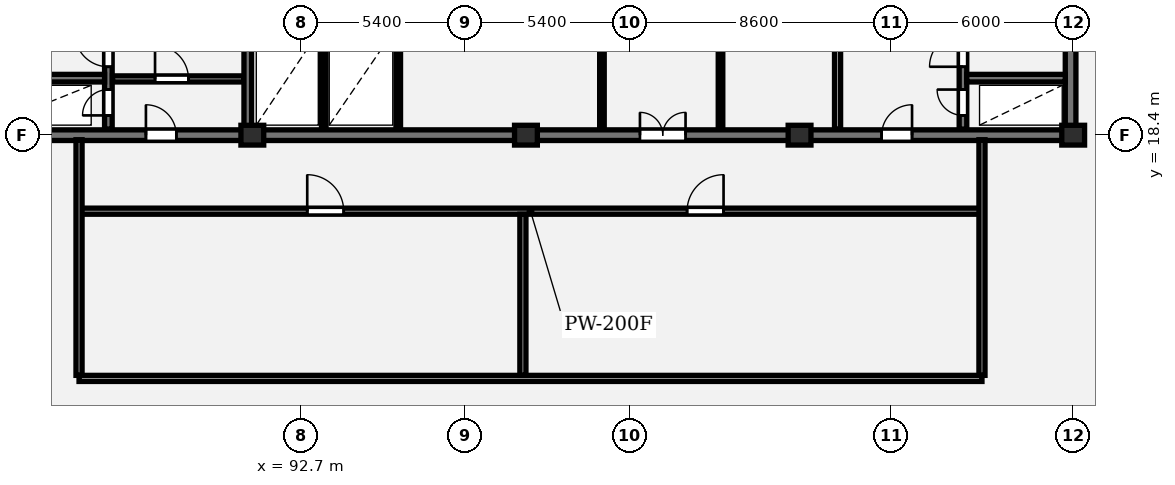
"""IFC4 building model, lengths in metres.
Left out: names, types, materials, properties, quantities, classifications, styles, units other than length and angle.
Written with IfcOpenShell. Run it as: python <this file> out.ifc"""

import sys

from ifc_helpers import new_model, si_unit, direction, frame, frame_2d, origin, origin_2d, place, context, subcontext, project, spatial, rectangle, extrude, element, fill, save


model = new_model("IFC4")
c1 = context("Model", 3, precision=1e-05, world=origin(), true_north=direction((0.0, 1.0)))
c2 = subcontext(c1, "Body", "Model", "MODEL_VIEW")
j1 = project(units=[si_unit("LENGTHUNIT", "METRE"), si_unit("PLANEANGLEUNIT", "RADIAN")], contexts=[c1])
p1 = place(None, origin())
s1 = spatial("IfcSite", under=j1, at=p1, CompositionType="ELEMENT")
p2 = place(p1, origin())
s2 = spatial("IfcBuilding", under=s1, at=p2, CompositionType="ELEMENT")
p3 = place(p2, frame((0.0, 0.0, 204.35)))
s3 = spatial("IfcBuildingStorey", under=s2, at=p3, CompositionType="ELEMENT", Elevation=204.35)
for number, where, z_axis, x_axis in (
    (1, (91.1, 18.4, 0.0), (0.0, 0.0, 1.0), (1.0, 0.0, 0.0)),
    (2, (100.1, 18.4, 0.0), (0.0, 0.0, 1.0), (1.0, 0.0, 0.0)),
    (3, (109.1, 18.4, 0.0), (0.0, 0.0, 1.0), (1.0, 0.0, 0.0)),
    (4, (118.1, 18.4, 0.0), (0.0, 0.0, 1.0), (1.0, 0.0, 0.0)),
):
    element("IfcColumn", number, at=place(p3, frame(where, z_axis=z_axis, x_axis=x_axis)), inside=s3, PredefinedType="COLUMN", context=c2, shape_type="SweptSolid", body=[
        extrude(rectangle(XDim=0.75, YDim=0.65, at=origin_2d()), origin(), (0.0, 0.0, 1.0), 3.25),
    ])
p4 = place(p3, frame((118.015, 18.575, 0.0), z_axis=(0.0, 0.0, 1.0), x_axis=(0.0, 1.0, 0.0)))
e5 = element("IfcWall", 5, at=p4, inside=s3, PredefinedType="SHEAR", context=c2, shape_type="SweptSolid", body=[
    extrude(rectangle(XDim=11.65, YDim=0.35, at=frame_2d((5.825, 0.0))), origin(), (0.0, 0.0, 1.0), 3.25),
])
p5 = place(p3, frame((81.925, 18.4, 0.0), z_axis=(0.0, 0.0, 1.0), x_axis=(1.0, 0.0, 0.0)))
e6 = element("IfcWall", 6, at=p5, inside=s3, PredefinedType="SHEAR", context=c2, shape_type="SweptSolid", body=[
    extrude(rectangle(XDim=36.265, YDim=0.35, at=frame_2d((18.132, 0.0))), origin(), (0.0, 0.0, 1.0), 3.25),
])
p6 = place(p5, frame((5.675, 0.0, 0.0)))
e7 = element("IfcOpeningElement", 7, at=p6, cuts=e6, PredefinedType="OPENING", context=c2, shape_type="SweptSolid", body=[
    extrude(rectangle(XDim=1.0, YDim=2.15, at=frame_2d((0.5, 1.075))), frame((0.0, 0.185, 0.0), z_axis=(0.0, -1.0, 0.0), x_axis=(1.0, 0.0, 0.0)), (0.0, 0.0, 1.0), 0.37),
])
p7 = place(p5, frame((21.925, 0.0, 0.0)))
e8 = element("IfcOpeningElement", 8, at=p7, cuts=e6, PredefinedType="OPENING", context=c2, shape_type="SweptSolid", body=[
    extrude(rectangle(XDim=1.5, YDim=2.2, at=frame_2d((0.75, 1.1))), frame((0.0, 0.185, 0.0), z_axis=(0.0, -1.0, 0.0), x_axis=(1.0, 0.0, 0.0)), (0.0, 0.0, 1.0), 0.37),
])
p8 = place(p5, frame((29.875, 0.0, 0.0)))
e9 = element("IfcOpeningElement", 9, at=p8, cuts=e6, PredefinedType="OPENING", context=c2, shape_type="SweptSolid", body=[
    extrude(rectangle(XDim=1.0, YDim=2.15, at=frame_2d((0.5, 1.075))), frame((0.0, 0.185, 0.0), z_axis=(0.0, -1.0, 0.0), x_axis=(1.0, 0.0, 0.0)), (0.0, 0.0, 1.0), 0.37),
])
p9 = place(p3, frame((86.365, 18.6, 0.0), z_axis=(0.0, 0.0, 1.0), x_axis=(0.0, 1.0, 0.0)))
e10 = element("IfcWall", 10, at=p9, inside=s3, PredefinedType="SHEAR", context=c2, shape_type="SweptSolid", body=[
    extrude(rectangle(XDim=11.6, YDim=0.25, at=frame_2d((5.8, 0.0))), origin(), (0.0, 0.0, 1.0), 3.25),
])
p10 = place(p9, frame((0.45, 0.0, 0.0)))
e11 = element("IfcOpeningElement", 11, at=p10, cuts=e10, PredefinedType="OPENING", context=c2, shape_type="SweptSolid", body=[
    extrude(rectangle(XDim=0.85, YDim=2.05, at=frame_2d((0.425, 1.025))), frame((0.0, 0.135, 0.0), z_axis=(0.0, -1.0, 0.0), x_axis=(1.0, 0.0, 0.0)), (0.0, 0.0, 1.0), 0.27),
])
p11 = place(p9, frame((2.05, 0.0, 0.0)))
e12 = element("IfcOpeningElement", 12, at=p11, cuts=e10, PredefinedType="OPENING", context=c2, shape_type="SweptSolid", body=[
    extrude(rectangle(XDim=1.1, YDim=2.1, at=frame_2d((0.55, 1.05))), frame((0.0, 0.135, 0.0), z_axis=(0.0, -1.0, 0.0), x_axis=(1.0, 0.0, 0.0)), (0.0, 0.0, 1.0), 0.27),
])
p12 = place(p9, frame((9.95, 0.0, 0.0)))
e13 = element("IfcOpeningElement", 13, at=p12, cuts=e10, PredefinedType="OPENING", context=c2, shape_type="SweptSolid", body=[
    extrude(rectangle(XDim=0.85, YDim=2.05, at=frame_2d((0.425, 1.025))), frame((0.0, 0.135, 0.0), z_axis=(0.0, -1.0, 0.0), x_axis=(1.0, 0.0, 0.0)), (0.0, 0.0, 1.0), 0.27),
])
p13 = place(p3, frame((83.0, 20.275, 0.0), z_axis=(0.0, 0.0, 1.0), x_axis=(1.0, 0.0, 0.0)))
e14 = element("IfcWall", 14, at=p13, inside=s3, PredefinedType="SHEAR", context=c2, shape_type="SweptSolid", body=[
    extrude(rectangle(XDim=3.24, YDim=0.25, at=frame_2d((1.62, 0.0))), origin(), (0.0, 0.0, 1.0), 3.25),
])
p14 = place(p3, frame((86.5, 20.25, 0.0), z_axis=(0.0, 0.0, 1.0), x_axis=(1.0, 0.0, 0.0)))
e15 = element("IfcWall", 15, at=p14, inside=s3, PredefinedType="PARTITIONING", context=c2, shape_type="SweptSolid", body=[
    extrude(rectangle(XDim=4.32, YDim=0.2, at=frame_2d((2.16, 0.0))), origin(), (0.0, 0.0, 1.0), 2.98),
])
p15 = place(p14, frame((1.4, 0.0, 0.0)))
e16 = element("IfcOpeningElement", 16, at=p15, cuts=e15, PredefinedType="OPENING", context=c2, shape_type="SweptSolid", body=[
    extrude(rectangle(XDim=1.1, YDim=2.1, at=frame_2d((0.55, 1.05))), frame((0.0, 0.11, 0.0), z_axis=(0.0, -1.0, 0.0), x_axis=(1.0, 0.0, 0.0)), (0.0, 0.0, 1.0), 0.22),
])
p16 = place(p3, frame((90.95, 18.6, 0.0), z_axis=(0.0, 0.0, 1.0), x_axis=(0.0, 1.0, 0.0)))
e17 = element("IfcWall", 17, at=p16, inside=s3, PredefinedType="SHEAR", context=c2, shape_type="SweptSolid", body=[
    extrude(rectangle(XDim=11.6, YDim=0.25, at=frame_2d((5.8, 0.0))), origin(), (0.0, 0.0, 1.0), 3.25),
])
p17 = place(p16, frame((4.6, 0.0, 0.0)))
e18 = element("IfcOpeningElement", 18, at=p17, cuts=e17, PredefinedType="OPENING", context=c2, shape_type="SweptSolid", body=[
    extrude(rectangle(XDim=1.1, YDim=2.1, at=frame_2d((0.55, 1.05))), frame((0.0, 0.135, 0.0), z_axis=(0.0, -1.0, 0.0), x_axis=(1.0, 0.0, 0.0)), (0.0, 0.0, 1.0), 0.27),
])
for number, where, z_axis, x_axis in (
    (19, (93.45, 18.6, 0.0), (0.0, 0.0, 1.0), (0.0, 1.0, 0.0)),
    (20, (95.9, 18.6, 0.0), (0.0, 0.0, 1.0), (0.0, 1.0, 0.0)),
    (21, (102.6, 18.6, 0.0), (0.0, 0.0, 1.0), (0.0, 1.0, 0.0)),
    (22, (106.5, 18.6, 0.0), (0.0, 0.0, 1.0), (0.0, 1.0, 0.0)),
):
    element("IfcWall", number, at=place(p3, frame(where, z_axis=z_axis, x_axis=x_axis)), inside=s3, PredefinedType="PARTITIONING", context=c2, shape_type="SweptSolid", body=[
        extrude(rectangle(XDim=3.6, YDim=0.15, at=frame_2d((1.8, 0.0))), origin(), (0.0, 0.0, 1.0), 2.98),
    ])
p18 = place(p3, frame((110.35, 18.6, 0.0), z_axis=(0.0, 0.0, 1.0), x_axis=(0.0, 1.0, 0.0)))
e23 = element("IfcWall", 23, at=p18, inside=s3, PredefinedType="PARTITIONING", context=c2, shape_type="SweptSolid", body=[
    extrude(rectangle(XDim=11.6, YDim=0.2, at=frame_2d((5.8, 0.0))), origin(), (0.0, 0.0, 1.0), 2.98),
])
p19 = place(p18, frame((5.2, 0.0, 0.0)))
e24 = element("IfcOpeningElement", 24, at=p19, cuts=e23, PredefinedType="OPENING", context=c2, shape_type="SweptSolid", body=[
    extrude(rectangle(XDim=1.1, YDim=2.15, at=frame_2d((0.55, 1.075))), frame((0.0, 0.11, 0.0), z_axis=(0.0, -1.0, 0.0), x_axis=(1.0, 0.0, 0.0)), (0.0, 0.0, 1.0), 0.22),
])
p20 = place(p3, frame((114.475, 18.6, 0.0), z_axis=(0.0, 0.0, 1.0), x_axis=(0.0, 1.0, 0.0)))
e25 = element("IfcWall", 25, at=p20, inside=s3, PredefinedType="SHEAR", context=c2, shape_type="SweptSolid", body=[
    extrude(rectangle(XDim=11.6, YDim=0.25, at=frame_2d((5.8, 0.0))), origin(), (0.0, 0.0, 1.0), 3.25),
])
p21 = place(p20, frame((0.45, 0.0, 0.0)))
e26 = element("IfcOpeningElement", 26, at=p21, cuts=e25, PredefinedType="OPENING", context=c2, shape_type="SweptSolid", body=[
    extrude(rectangle(XDim=0.85, YDim=2.05, at=frame_2d((0.425, 1.025))), frame((0.0, 0.135, 0.0), z_axis=(0.0, -1.0, 0.0), x_axis=(1.0, 0.0, 0.0)), (0.0, 0.0, 1.0), 0.27),
])
p22 = place(p20, frame((2.05, 0.0, 0.0)))
e27 = element("IfcOpeningElement", 27, at=p22, cuts=e25, PredefinedType="OPENING", context=c2, shape_type="SweptSolid", body=[
    extrude(rectangle(XDim=1.1, YDim=2.1, at=frame_2d((0.55, 1.05))), frame((0.0, 0.135, 0.0), z_axis=(0.0, -1.0, 0.0), x_axis=(1.0, 0.0, 0.0)), (0.0, 0.0, 1.0), 0.27),
])
p23 = place(p20, frame((9.95, 0.0, 0.0)))
e28 = element("IfcOpeningElement", 28, at=p23, cuts=e25, PredefinedType="OPENING", context=c2, shape_type="SweptSolid", body=[
    extrude(rectangle(XDim=0.85, YDim=2.05, at=frame_2d((0.425, 1.025))), frame((0.0, 0.135, 0.0), z_axis=(0.0, -1.0, 0.0), x_axis=(1.0, 0.0, 0.0)), (0.0, 0.0, 1.0), 0.27),
])
p24 = place(p3, frame((114.6, 20.275, 0.0), z_axis=(0.0, 0.0, 1.0), x_axis=(1.0, 0.0, 0.0)))
e29 = element("IfcWall", 29, at=p24, inside=s3, PredefinedType="SHEAR", context=c2, shape_type="SweptSolid", body=[
    extrude(rectangle(XDim=3.24, YDim=0.25, at=frame_2d((1.62, 0.0))), origin(), (0.0, 0.0, 1.0), 3.25),
])
p25 = place(p3, frame((85.4, 15.9, 0.0), z_axis=(0.0, 0.0, 1.0), x_axis=(1.0, 0.0, 0.0)))
e30 = element("IfcWall", 30, at=p25, inside=s3, PredefinedType="PARTITIONING", context=c2, shape_type="SweptSolid", body=[
    extrude(rectangle(XDim=29.7, YDim=0.2, at=frame_2d((14.85, 0.0))), origin(), (0.0, 0.0, 1.0), 2.98),
])
p26 = place(p25, frame((7.506, 0.0, 0.0)))
e31 = element("IfcOpeningElement", 31, at=p26, cuts=e30, PredefinedType="OPENING", context=c2, shape_type="SweptSolid", body=[
    extrude(rectangle(XDim=1.2, YDim=2.15, at=frame_2d((0.6, 1.075))), frame((0.0, 0.11, 0.0), z_axis=(0.0, -1.0, 0.0), x_axis=(1.0, 0.0, 0.0)), (0.0, 0.0, 1.0), 0.22),
])
p27 = place(p25, frame((20.0, 0.0, 0.0)))
e32 = element("IfcOpeningElement", 32, at=p27, cuts=e30, PredefinedType="OPENING", context=c2, shape_type="SweptSolid", body=[
    extrude(rectangle(XDim=1.2, YDim=2.15, at=frame_2d((0.6, 1.075))), frame((0.0, 0.11, 0.0), z_axis=(0.0, -1.0, 0.0), x_axis=(1.0, 0.0, 0.0)), (0.0, 0.0, 1.0), 0.22),
])
p28 = place(p3, frame((85.4, 10.4, 0.0), z_axis=(0.0, 0.0, 1.0), x_axis=(1.0, 0.0, 0.0)))
e33 = element("IfcWall", 33, at=p28, inside=s3, PredefinedType="PARTITIONING", context=c2, shape_type="SweptSolid", body=[
    extrude(rectangle(XDim=29.7, YDim=0.2, at=frame_2d((14.85, 0.0))), origin(), (0.0, 0.0, 1.0), 2.98),
])
for number, where, z_axis, x_axis in (
    (34, (85.4, 10.5, 0.0), (0.0, 0.0, 1.0), (0.0, 1.0, 0.0)),
    (35, (115.1, 10.5, 0.0), (0.0, 0.0, 1.0), (0.0, 1.0, 0.0)),
):
    element("IfcWall", number, at=place(p3, frame(where, z_axis=z_axis, x_axis=x_axis)), inside=s3, PredefinedType="PARTITIONING", context=c2, shape_type="SweptSolid", body=[
        extrude(rectangle(XDim=7.75, YDim=0.2, at=frame_2d((3.875, 0.0))), origin(), (0.0, 0.0, 1.0), 2.98),
    ])
p29 = place(p3, frame((100.0, 10.5, 0.0), z_axis=(0.0, 0.0, 1.0), x_axis=(0.0, 1.0, 0.0)))
e36 = element("IfcWall", 36, at=p29, inside=s3, PredefinedType="PARTITIONING", context=c2, shape_type="SweptSolid", body=[
    extrude(rectangle(XDim=5.3, YDim=0.2, at=frame_2d((2.65, 0.0))), origin(), (0.0, 0.0, 1.0), 2.21),
])
p30 = place(p6, origin())
e37 = element("IfcDoor", 37, at=p30, inside=s3, OperationType="SINGLE_SWING_LEFT", PredefinedType="DOOR", context=c2, shape_type="SweptSolid", body=[
    extrude(rectangle(XDim=1.0, YDim=2.15, at=frame_2d((0.5, 1.075))), frame((0.0, 0.025, 0.0), z_axis=(0.0, -1.0, 0.0), x_axis=(1.0, 0.0, 0.0)), (0.0, 0.0, 1.0), 0.05),
])
fill(e7, e37)
p31 = place(p7, origin())
e38 = element("IfcDoor", 38, at=p31, inside=s3, OperationType="DOUBLE_DOOR_SINGLE_SWING", PredefinedType="DOOR", context=c2, shape_type="SweptSolid", body=[
    extrude(rectangle(XDim=1.5, YDim=2.2, at=frame_2d((0.75, 1.1))), frame((0.0, 0.025, 0.0), z_axis=(0.0, -1.0, 0.0), x_axis=(1.0, 0.0, 0.0)), (0.0, 0.0, 1.0), 0.05),
])
fill(e8, e38)
p32 = place(p8, origin())
e39 = element("IfcDoor", 39, at=p32, inside=s3, OperationType="SINGLE_SWING_RIGHT", PredefinedType="DOOR", context=c2, shape_type="SweptSolid", body=[
    extrude(rectangle(XDim=1.0, YDim=2.15, at=frame_2d((0.5, 1.075))), frame((0.0, 0.025, 0.0), z_axis=(0.0, -1.0, 0.0), x_axis=(1.0, 0.0, 0.0)), (0.0, 0.0, 1.0), 0.05),
])
fill(e9, e39)
p33 = place(p10, origin())
e40 = element("IfcDoor", 40, at=p33, inside=s3, OperationType="SINGLE_SWING_LEFT", PredefinedType="DOOR", context=c2, shape_type="SweptSolid", body=[
    extrude(rectangle(XDim=0.85, YDim=2.05, at=frame_2d((0.425, 1.025))), frame((0.0, 0.025, 0.0), z_axis=(0.0, -1.0, 0.0), x_axis=(1.0, 0.0, 0.0)), (0.0, 0.0, 1.0), 0.05),
])
fill(e11, e40)
p34 = place(p11, origin())
e41 = element("IfcDoor", 41, at=p34, inside=s3, OperationType="SINGLE_SWING_RIGHT", PredefinedType="DOOR", context=c2, shape_type="SweptSolid", body=[
    extrude(rectangle(XDim=1.1, YDim=2.1, at=frame_2d((0.55, 1.05))), frame((0.0, 0.025, 0.0), z_axis=(0.0, -1.0, 0.0), x_axis=(1.0, 0.0, 0.0)), (0.0, 0.0, 1.0), 0.05),
])
fill(e12, e41)
p35 = place(p15, origin())
e42 = element("IfcDoor", 42, at=p35, inside=s3, OperationType="SINGLE_SWING_LEFT", PredefinedType="DOOR", context=c2, shape_type="SweptSolid", body=[
    extrude(rectangle(XDim=1.1, YDim=2.1, at=frame_2d((0.55, 1.05))), frame((0.0, 0.025, 0.0), z_axis=(0.0, -1.0, 0.0), x_axis=(1.0, 0.0, 0.0)), (0.0, 0.0, 1.0), 0.05),
])
fill(e16, e42)
p36 = place(p21, origin())
e43 = element("IfcDoor", 43, at=p36, inside=s3, OperationType="SINGLE_SWING_RIGHT", PredefinedType="DOOR", context=c2, shape_type="SweptSolid", body=[
    extrude(rectangle(XDim=0.85, YDim=2.05, at=frame_2d((0.425, 1.025))), frame((0.0, 0.025, 0.0), z_axis=(0.0, -1.0, 0.0), x_axis=(1.0, 0.0, 0.0)), (0.0, 0.0, 1.0), 0.05),
])
fill(e26, e43)
p37 = place(p22, origin())
e44 = element("IfcDoor", 44, at=p37, inside=s3, OperationType="SINGLE_SWING_LEFT", PredefinedType="DOOR", context=c2, shape_type="SweptSolid", body=[
    extrude(rectangle(XDim=1.1, YDim=2.1, at=frame_2d((0.55, 1.05))), frame((0.0, 0.025, 0.0), z_axis=(0.0, -1.0, 0.0), x_axis=(1.0, 0.0, 0.0)), (0.0, 0.0, 1.0), 0.05),
])
fill(e27, e44)
p38 = place(p26, origin())
e45 = element("IfcDoor", 45, at=p38, inside=s3, OperationType="SINGLE_SWING_LEFT", PredefinedType="DOOR", context=c2, shape_type="SweptSolid", body=[
    extrude(rectangle(XDim=1.2, YDim=2.15, at=frame_2d((0.6, 1.075))), frame((0.0, 0.025, 0.0), z_axis=(0.0, -1.0, 0.0), x_axis=(1.0, 0.0, 0.0)), (0.0, 0.0, 1.0), 0.05),
])
fill(e31, e45)
p39 = place(p27, origin())
e46 = element("IfcDoor", 46, at=p39, inside=s3, OperationType="SINGLE_SWING_RIGHT", PredefinedType="DOOR", context=c2, shape_type="SweptSolid", body=[
    extrude(rectangle(XDim=1.2, YDim=2.15, at=frame_2d((0.6, 1.075))), frame((0.0, 0.025, 0.0), z_axis=(0.0, -1.0, 0.0), x_axis=(1.0, 0.0, 0.0)), (0.0, 0.0, 1.0), 0.05),
])
fill(e32, e46)
save(model, sys.argv[1])
